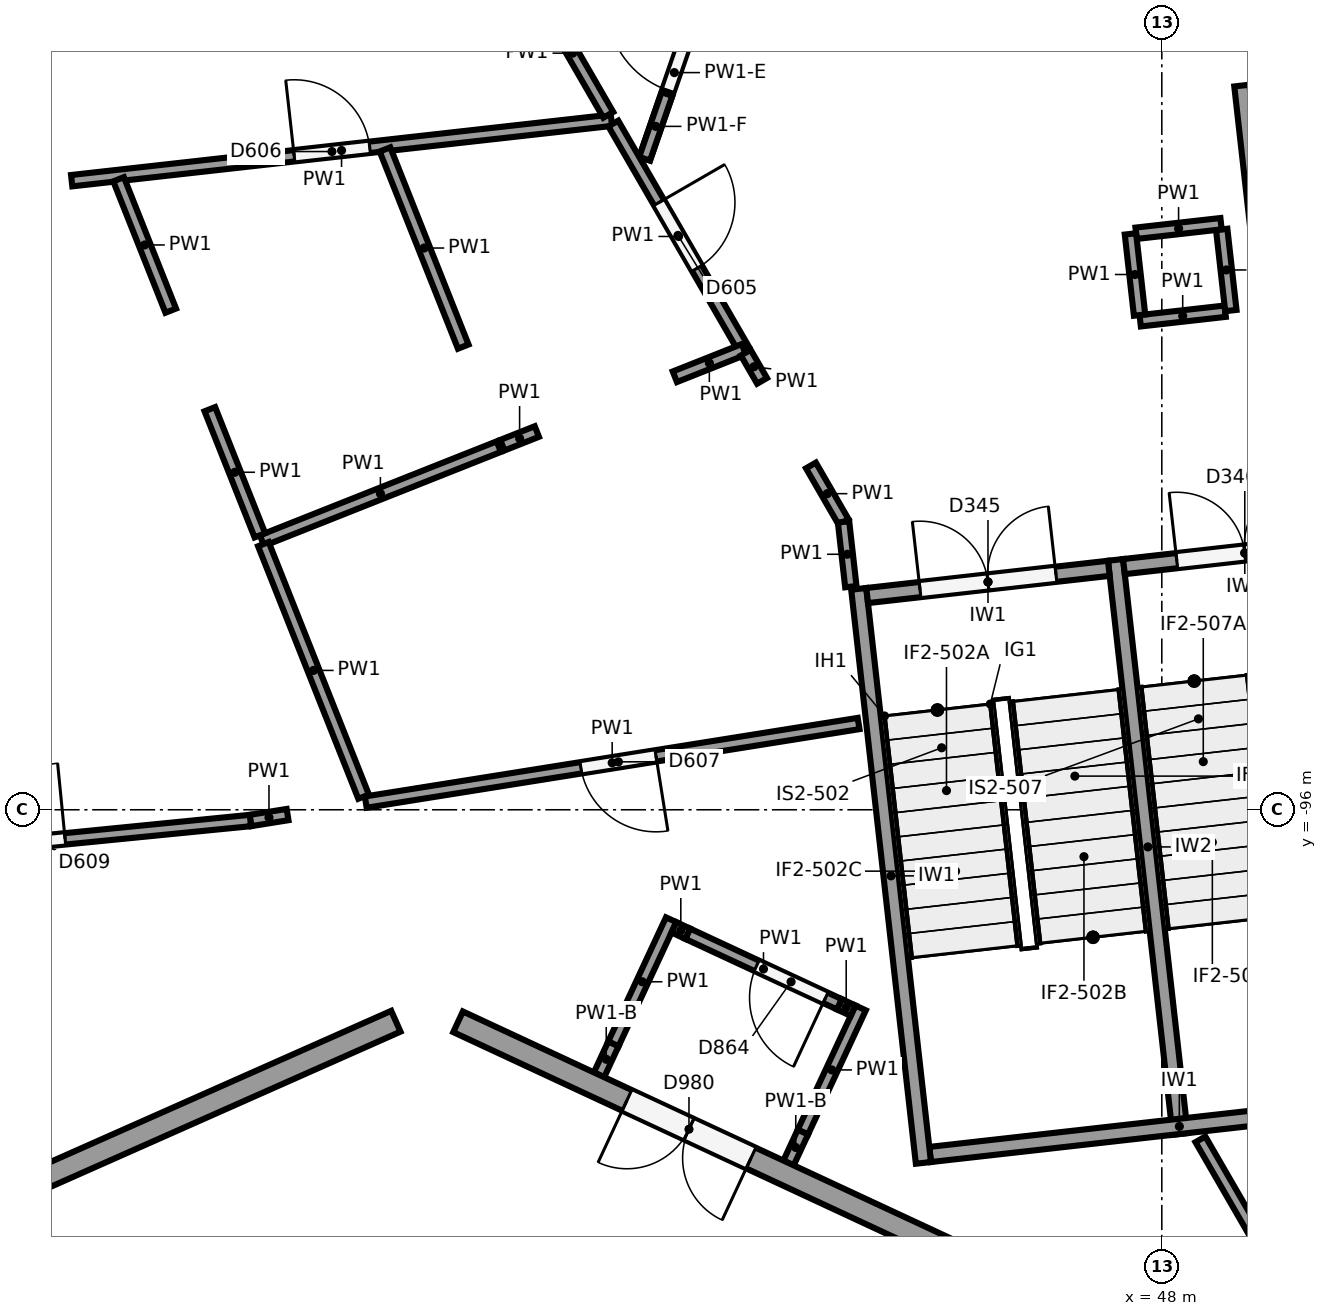
"""IFC4 building model, lengths in metres.
Left out: names, types, materials, properties, quantities, classifications, styles, units other than length and angle.
Written with IfcOpenShell. Run it as: python <this file> out.ifc"""

import sys

from ifc_helpers import new_model, si_unit, direction, frame, frame_2d, origin, origin_2d, place, context, subcontext, project, spatial, rectangle, circle, extrude, element, fill, save


model = new_model("IFC4")
c1 = context("Model", 3, precision=1e-05, world=origin(), true_north=direction((0.0, 1.0)))
c2 = subcontext(c1, "Body", "Model", "MODEL_VIEW")
j1 = project(units=[si_unit("LENGTHUNIT", "METRE"), si_unit("PLANEANGLEUNIT", "RADIAN")], contexts=[c1])
p1 = place(None, origin())
s1 = spatial("IfcSite", under=j1, at=p1, CompositionType="ELEMENT")
p2 = place(p1, origin())
s2 = spatial("IfcBuilding", under=s1, at=p2, CompositionType="ELEMENT")
p3 = place(p2, origin())
s3 = spatial("IfcBuildingStorey", under=s2, at=p3, CompositionType="ELEMENT", Elevation=0.0)
for number, where, z_axis, x_axis in (
    (1, (34.531, -89.912, 0.0), (0.0, 0.0, 1.0), (1.0, 0.0, 0.0)),
    (2, (38.333, -98.6, 0.0), (0.0, 0.0, 1.0), (1.0, 0.0, 0.0)),
):
    element("IfcColumn", number, at=place(p3, frame(where, z_axis=z_axis, x_axis=x_axis)), inside=s3, PredefinedType="COLUMN", context=c2, shape_type="SweptSolid", body=[
        extrude(circle(Radius=0.45, at=origin_2d()), origin(), (0.0, 0.0, 1.0), 6.5),
    ])
p4 = place(p3, frame((44.683, -91.091, 0.0), z_axis=(0.0, 0.0, 1.0), x_axis=(1.0, 0.0, 0.0)))
e3 = element("IfcColumn", 3, at=p4, inside=s3, PredefinedType="COLUMN", context=c2, shape_type="SweptSolid", body=[
    extrude(circle(Radius=0.55, at=origin_2d()), origin(), (0.0, 0.0, 1.0), 6.5),
])
p5 = place(p3, frame((37.922, -98.782, 0.0), z_axis=(0.0, 0.0, 1.0), x_axis=(-0.914138897099, -0.405401130748, 0.0)))
e4 = element("IfcWall", 4, at=p5, inside=s3, PredefinedType="SOLIDWALL", context=c2, shape_type="SweptSolid", body=[
    extrude(rectangle(XDim=15.824, YDim=0.3, at=frame_2d((7.912, 0.0))), origin(), (0.0, 0.0, 1.0), 4.85),
])
p6 = place(p3, frame((51.569, -104.757, 0.0), z_axis=(0.0, 0.0, 1.0), x_axis=(-0.906698705786, 0.421778919491, 0.0)))
e5 = element("IfcWall", 5, at=p6, inside=s3, PredefinedType="SOLIDWALL", context=c2, shape_type="SweptSolid", body=[
    extrude(rectangle(XDim=14.148, YDim=0.3, at=frame_2d((7.074, 0.0))), origin(), (0.0, 0.0, 1.0), 4.85),
])
p7 = place(p6, frame((9.897, 0.0, 0.0)))
e6 = element("IfcOpeningElement", 6, at=p7, cuts=e5, PredefinedType="OPENING", context=c2, shape_type="SweptSolid", body=[
    extrude(rectangle(XDim=1.8, YDim=2.4, at=frame_2d((0.9, 1.2))), frame((0.0, 0.16, 0.0), z_axis=(0.0, -1.0, 0.0), x_axis=(1.0, 0.0, 0.0)), (0.0, 0.0, 1.0), 0.32),
])
p8 = place(p3, frame((44.863, -100.646, 0.0), z_axis=(0.0, 0.0, 1.0), x_axis=(-0.111951003472, 0.993713727802, 0.0)))
e7 = element("IfcWall", 7, at=p8, inside=s3, PredefinedType="SHEAR", context=c2, shape_type="SweptSolid", body=[
    extrude(rectangle(XDim=7.6, YDim=0.2, at=frame_2d((3.8, 0.0))), origin(), (0.0, 0.0, 1.0), 6.15),
])
p9 = place(p3, frame((44.951, -100.535, 0.0), z_axis=(0.0, 0.0, 1.0), x_axis=(0.993711575492, 0.111970106426, 0.0)))
e8 = element("IfcWall", 8, at=p9, inside=s3, PredefinedType="SHEAR", context=c2, shape_type="SweptSolid", body=[
    extrude(rectangle(XDim=6.6, YDim=0.2, at=frame_2d((3.3, 0.0))), origin(), (0.0, 0.0, 1.0), 6.15),
])
p10 = place(p3, frame((48.242, -100.265, 0.0), z_axis=(0.0, 0.0, 1.0), x_axis=(-0.111954577255, 0.993713325176, 0.0)))
e9 = element("IfcWall", 9, at=p10, inside=s3, PredefinedType="SHEAR", context=c2, shape_type="SweptSolid", body=[
    extrude(rectangle(XDim=7.6, YDim=0.2, at=frame_2d((3.8, 0.0))), origin(), (0.0, 0.0, 1.0), 6.15),
])
p11 = place(p3, frame((44.123, -93.182, 0.0), z_axis=(0.0, 0.0, 1.0), x_axis=(0.993717005286, 0.11192190762, 0.0)))
e10 = element("IfcWall", 10, at=p11, inside=s3, PredefinedType="SHEAR", context=c2, shape_type="SweptSolid", body=[
    extrude(rectangle(XDim=3.2, YDim=0.2, at=frame_2d((1.6, 0.0))), origin(), (0.0, 0.0, 1.0), 6.15),
])
p12 = place(p11, frame((0.7, 0.0, 0.0)))
e11 = element("IfcOpeningElement", 11, at=p12, cuts=e10, PredefinedType="OPENING", context=c2, shape_type="SweptSolid", body=[
    extrude(rectangle(XDim=1.8, YDim=2.1, at=frame_2d((0.9, 1.05))), frame((0.0, 0.11, 0.0), z_axis=(0.0, -1.0, 0.0), x_axis=(1.0, 0.0, 0.0)), (0.0, 0.0, 1.0), 0.22),
])
p13 = place(p3, frame((47.502, -92.801, 0.0), z_axis=(0.0, 0.0, 1.0), x_axis=(0.993707560215, 0.112005735442, 0.0)))
e12 = element("IfcWall", 12, at=p13, inside=s3, PredefinedType="SHEAR", context=c2, shape_type="SweptSolid", body=[
    extrude(rectangle(XDim=3.2, YDim=0.2, at=frame_2d((1.6, 0.0))), origin(), (0.0, 0.0, 1.0), 6.15),
])
p14 = place(p13, frame((0.7, 0.0, 0.0)))
e13 = element("IfcOpeningElement", 13, at=p14, cuts=e12, PredefinedType="OPENING", context=c2, shape_type="SweptSolid", body=[
    extrude(rectangle(XDim=1.8, YDim=2.1, at=frame_2d((0.9, 1.05))), frame((0.0, 0.11, 0.0), z_axis=(0.0, -1.0, 0.0), x_axis=(1.0, 0.0, 0.0)), (0.0, 0.0, 1.0), 0.22),
])
p15 = place(p3, frame((49.389, -89.454, 0.0), z_axis=(0.0, 0.0, 1.0), x_axis=(-0.111976588553, 0.993710845073, 0.0)))
e14 = element("IfcWall", 14, at=p15, inside=s3, PredefinedType="SHEAR", context=c2, shape_type="SweptSolid", body=[
    extrude(rectangle(XDim=3.0, YDim=0.2, at=frame_2d((1.5, 0.0))), origin(), (0.0, 0.0, 1.0), 6.15),
])
p16 = place(p3, frame((33.657, -87.724, 0.0), z_axis=(0.0, 0.0, 1.0), x_axis=(0.993792986052, 0.111245228541, 0.0)))
e15 = element("IfcWall", 15, at=p16, inside=s3, PredefinedType="PARTITIONING", context=c2, shape_type="SweptSolid", body=[
    extrude(rectangle(XDim=7.146, YDim=0.15, at=frame_2d((3.573, 0.0))), origin(), (0.0, 0.0, 1.0), 6.15),
])
p17 = place(p16, frame((2.946, 0.0, 0.0)))
e16 = element("IfcOpeningElement", 16, at=p17, cuts=e15, PredefinedType="OPENING", context=c2, shape_type="SweptSolid", body=[
    extrude(rectangle(XDim=1.0, YDim=2.1, at=frame_2d((0.5, 1.05))), frame((0.0, 0.085, 0.0), z_axis=(0.0, -1.0, 0.0), x_axis=(1.0, 0.0, 0.0)), (0.0, 0.0, 1.0), 0.17),
])
p18 = place(p3, frame((39.779, -85.235, 0.0), z_axis=(0.0, 0.0, 1.0), x_axis=(0.500425153996, -0.865779801825, 0.0)))
e17 = element("IfcWall", 17, at=p18, inside=s3, PredefinedType="PARTITIONING", context=c2, shape_type="SweptSolid", body=[
    extrude(rectangle(XDim=1.874, YDim=0.15, at=frame_2d((0.937, 0.0))), origin(), (0.0, 0.0, 1.0), 6.15),
])
p19 = place(p3, frame((40.783, -86.972, 0.0), z_axis=(0.0, 0.0, 1.0), x_axis=(0.500377149394, -0.865807546955, 0.0)))
e18 = element("IfcWall", 18, at=p19, inside=s3, PredefinedType="PARTITIONING", context=c2, shape_type="SweptSolid", body=[
    extrude(rectangle(XDim=3.432, YDim=0.15, at=frame_2d((1.716, 0.0))), origin(), (0.0, 0.0, 1.0), 6.15),
])
p20 = place(p19, frame((1.2, 0.0, 0.0)))
e19 = element("IfcOpeningElement", 19, at=p20, cuts=e18, PredefinedType="OPENING", context=c2, shape_type="SweptSolid", body=[
    extrude(rectangle(XDim=1.0, YDim=2.1, at=frame_2d((0.5, 1.05))), frame((0.0, 0.085, 0.0), z_axis=(0.0, -1.0, 0.0), x_axis=(1.0, 0.0, 0.0)), (0.0, 0.0, 1.0), 0.17),
])
p21 = place(p3, frame((42.501, -89.943, 0.0), z_axis=(0.0, 0.0, 1.0), x_axis=(-0.929524719877, -0.368759806837, 0.0)))
e20 = element("IfcWall", 20, at=p21, inside=s3, PredefinedType="PARTITIONING", context=c2, shape_type="SweptSolid", body=[
    extrude(rectangle(XDim=0.977, YDim=0.15, at=frame_2d((0.488, 0.0))), origin(), (0.0, 0.0, 1.0), 6.15),
])
p22 = place(p3, frame((39.777, -91.024, 0.0), z_axis=(0.0, 0.0, 1.0), x_axis=(-0.929439007566, -0.368975786758, 0.0)))
e21 = element("IfcWall", 21, at=p22, inside=s3, PredefinedType="PARTITIONING", context=c2, shape_type="SweptSolid", body=[
    extrude(rectangle(XDim=0.488, YDim=0.15, at=frame_2d((0.244, 0.0))), origin(), (0.0, 0.0, 1.0), 6.15),
])
p23 = place(p3, frame((38.809, -89.907, 0.0), z_axis=(0.0, 0.0, 1.0), x_axis=(-0.368870710823, 0.929480714537, 0.0)))
e22 = element("IfcWall", 22, at=p23, inside=s3, PredefinedType="PARTITIONING", context=c2, shape_type="SweptSolid", body=[
    extrude(rectangle(XDim=2.791, YDim=0.15, at=frame_2d((1.396, 0.0))), origin(), (0.0, 0.0, 1.0), 6.15),
])
p24 = place(p3, frame((39.277, -91.222, 0.0), z_axis=(0.0, 0.0, 1.0), x_axis=(-0.929492692584, -0.368840527103, 0.0)))
e23 = element("IfcWall", 23, at=p24, inside=s3, PredefinedType="PARTITIONING", context=c2, shape_type="SweptSolid", body=[
    extrude(rectangle(XDim=3.353, YDim=0.15, at=frame_2d((1.676, 0.0))), origin(), (0.0, 0.0, 1.0), 6.15),
])
p25 = place(p3, frame((36.133, -92.389, 0.0), z_axis=(0.0, 0.0, 1.0), x_axis=(-0.368794869891, 0.929510808943, 0.0)))
e24 = element("IfcWall", 24, at=p25, inside=s3, PredefinedType="PARTITIONING", context=c2, shape_type="SweptSolid", body=[
    extrude(rectangle(XDim=1.785, YDim=0.15, at=frame_2d((0.892, 0.0))), origin(), (0.0, 0.0, 1.0), 6.15),
])
p26 = place(p3, frame((34.96, -89.434, 0.0), z_axis=(0.0, 0.0, 1.0), x_axis=(-0.368854520824, 0.929487139485, 0.0)))
e25 = element("IfcWall", 25, at=p26, inside=s3, PredefinedType="PARTITIONING", context=c2, shape_type="SweptSolid", body=[
    extrude(rectangle(XDim=1.86, YDim=0.15, at=frame_2d((0.93, 0.0))), origin(), (0.0, 0.0, 1.0), 6.15),
])
p27 = place(p3, frame((44.011, -94.865, 0.0), z_axis=(0.0, 0.0, 1.0), x_axis=(-0.98752031679, -0.157491663037, 0.0)))
e26 = element("IfcWall", 26, at=p27, inside=s3, PredefinedType="PARTITIONING", context=c2, shape_type="SweptSolid", body=[
    extrude(rectangle(XDim=6.567, YDim=0.15, at=frame_2d((3.283, 0.0))), origin(), (0.0, 0.0, 1.0), 6.15),
])
p28 = place(p27, frame((2.7, 0.0, 0.0)))
e27 = element("IfcOpeningElement", 27, at=p28, cuts=e26, PredefinedType="OPENING", context=c2, shape_type="SweptSolid", body=[
    extrude(rectangle(XDim=1.0, YDim=2.1, at=frame_2d((0.5, 1.05))), frame((0.0, 0.085, 0.0), z_axis=(0.0, -1.0, 0.0), x_axis=(1.0, 0.0, 0.0)), (0.0, 0.0, 1.0), 0.17),
])
p29 = place(p3, frame((37.498, -95.828, 0.0), z_axis=(0.0, 0.0, 1.0), x_axis=(-0.368822104186, 0.929500002939, 0.0)))
e28 = element("IfcWall", 28, at=p29, inside=s3, PredefinedType="PARTITIONING", context=c2, shape_type="SweptSolid", body=[
    extrude(rectangle(XDim=3.574, YDim=0.15, at=frame_2d((1.787, 0.0))), origin(), (0.0, 0.0, 1.0), 6.15),
])
p30 = place(p3, frame((42.526, -89.986, 0.0), z_axis=(0.0, 0.0, 1.0), x_axis=(0.500182682664, -0.865919906206, 0.0)))
e29 = element("IfcWall", 29, at=p30, inside=s3, PredefinedType="PARTITIONING", context=c2, shape_type="SweptSolid", body=[
    extrude(rectangle(XDim=0.428, YDim=0.15, at=frame_2d((0.214, 0.0))), origin(), (0.0, 0.0, 1.0), 6.15),
])
p31 = place(p3, frame((43.384, -91.47, 0.0), z_axis=(0.0, 0.0, 1.0), x_axis=(0.500396216532, -0.865796527182, 0.0)))
e30 = element("IfcWall", 30, at=p31, inside=s3, PredefinedType="PARTITIONING", context=c2, shape_type="SweptSolid", body=[
    extrude(rectangle(XDim=0.857, YDim=0.15, at=frame_2d((0.429, 0.0))), origin(), (0.0, 0.0, 1.0), 6.15),
])
p32 = place(p3, frame((43.812, -92.212, 0.0), z_axis=(0.0, 0.0, 1.0), x_axis=(0.112117924941, -0.993694908363, 0.0)))
e31 = element("IfcWall", 31, at=p32, inside=s3, PredefinedType="PARTITIONING", context=c2, shape_type="SweptSolid", body=[
    extrude(rectangle(XDim=0.858, YDim=0.15, at=frame_2d((0.429, 0.0))), origin(), (0.0, 0.0, 1.0), 6.15),
])
p33 = place(p3, frame((36.498, -96.063, 0.0), z_axis=(0.0, 0.0, 1.0), x_axis=(-0.987477522221, -0.157759763909, 0.0)))
e32 = element("IfcWall", 32, at=p33, inside=s3, PredefinedType="PARTITIONING", context=c2, shape_type="SweptSolid", body=[
    extrude(rectangle(XDim=0.495, YDim=0.15, at=frame_2d((0.248, 0.0))), origin(), (0.0, 0.0, 1.0), 6.15),
])
p34 = place(p3, frame((30.0, -96.736, 0.0), z_axis=(0.0, 0.0, 1.0), x_axis=(0.995133204742, 0.098538849293, 0.0)))
e33 = element("IfcWall", 33, at=p34, inside=s3, PredefinedType="PARTITIONING", context=c2, shape_type="SweptSolid", body=[
    extrude(rectangle(XDim=6.038, YDim=0.15, at=frame_2d((3.019, 0.0))), origin(), (0.0, 0.0, 1.0), 6.15),
])
p35 = place(p34, frame((2.588, 0.0, 0.0)))
e34 = element("IfcOpeningElement", 34, at=p35, cuts=e33, PredefinedType="OPENING", context=c2, shape_type="SweptSolid", body=[
    extrude(rectangle(XDim=1.0, YDim=2.1, at=frame_2d((0.5, 1.05))), frame((0.0, 0.085, 0.0), z_axis=(0.0, -1.0, 0.0), x_axis=(1.0, 0.0, 0.0)), (0.0, 0.0, 1.0), 0.17),
])
p36 = place(p3, frame((48.508, -100.336, 0.0), z_axis=(0.0, 0.0, 1.0), x_axis=(0.500439359674, -0.865771590715, 0.0)))
e35 = element("IfcWall", 35, at=p36, inside=s3, PredefinedType="PARTITIONING", context=c2, shape_type="SweptSolid", body=[
    extrude(rectangle(XDim=3.822, YDim=0.15, at=frame_2d((1.911, 0.0))), origin(), (0.0, 0.0, 1.0), 6.15),
])
p37 = place(p3, frame((47.716, -89.567, 0.0), z_axis=(0.0, 0.0, 1.0), x_axis=(0.993710504932, 0.11197960702, 0.0)))
e36 = element("IfcWall", 36, at=p37, inside=s3, PredefinedType="PARTITIONING", context=c2, shape_type="SweptSolid", body=[
    extrude(rectangle(XDim=1.125, YDim=0.15, at=frame_2d((0.562, 0.0))), origin(), (0.0, 0.0, 1.0), 6.15),
])
p38 = place(p3, frame((48.908, -89.432, 0.0), z_axis=(0.0, 0.0, 1.0), x_axis=(-0.111951742856, 0.993713644503, 0.0)))
e37 = element("IfcWall", 37, at=p38, inside=s3, PredefinedType="PARTITIONING", context=c2, shape_type="SweptSolid", body=[
    extrude(rectangle(XDim=1.075, YDim=0.15, at=frame_2d((0.538, 0.0))), origin(), (0.0, 0.0, 1.0), 6.15),
])
p39 = place(p3, frame((48.78, -88.29, 0.0), z_axis=(0.0, 0.0, 1.0), x_axis=(-0.993710504932, -0.11197960702, 0.0)))
e38 = element("IfcWall", 38, at=p39, inside=s3, PredefinedType="PARTITIONING", context=c2, shape_type="SweptSolid", body=[
    extrude(rectangle(XDim=1.125, YDim=0.15, at=frame_2d((0.562, 0.0))), origin(), (0.0, 0.0, 1.0), 6.15),
])
p40 = place(p3, frame((47.587, -88.424, 0.0), z_axis=(0.0, 0.0, 1.0), x_axis=(0.111951742856, -0.993713644503, 0.0)))
e39 = element("IfcWall", 39, at=p40, inside=s3, PredefinedType="PARTITIONING", context=c2, shape_type="SweptSolid", body=[
    extrude(rectangle(XDim=1.075, YDim=0.15, at=frame_2d((0.538, 0.0))), origin(), (0.0, 0.0, 1.0), 6.15),
])
p41 = place(p3, frame((43.089, -100.647, 0.0), z_axis=(0.0, 0.0, 1.0), x_axis=(0.421429993288, 0.906860937938, 0.0)))
e40 = element("IfcWall", 40, at=p41, inside=s3, PredefinedType="PARTITIONING", context=c2, shape_type="SweptSolid", body=[
    extrude(rectangle(XDim=0.45, YDim=0.15, at=frame_2d((0.225, 0.0))), origin(), (0.0, 0.0, 1.0), 4.85),
])
p42 = place(p3, frame((43.279, -100.239, 0.0), z_axis=(0.0, 0.0, 1.0), x_axis=(0.421860420743, 0.906660788504, 0.0)))
e41 = element("IfcWall", 41, at=p42, inside=s3, PredefinedType="PARTITIONING", context=c2, shape_type="SweptSolid", body=[
    extrude(rectangle(XDim=1.8, YDim=0.15, at=frame_2d((0.9, 0.0))), origin(), (0.0, 0.0, 1.0), 6.15),
])
p43 = place(p3, frame((40.595, -99.487, 0.0), z_axis=(0.0, 0.0, 1.0), x_axis=(0.42163737055, 0.90676453821, 0.0)))
e42 = element("IfcWall", 42, at=p43, inside=s3, PredefinedType="PARTITIONING", context=c2, shape_type="SweptSolid", body=[
    extrude(rectangle(XDim=0.45, YDim=0.15, at=frame_2d((0.225, 0.0))), origin(), (0.0, 0.0, 1.0), 4.85),
])
p44 = place(p3, frame((40.785, -99.079, 0.0), z_axis=(0.0, 0.0, 1.0), x_axis=(0.421697036053, 0.906736791899, 0.0)))
e43 = element("IfcWall", 43, at=p44, inside=s3, PredefinedType="PARTITIONING", context=c2, shape_type="SweptSolid", body=[
    extrude(rectangle(XDim=1.8, YDim=0.15, at=frame_2d((0.9, 0.0))), origin(), (0.0, 0.0, 1.0), 6.15),
])
p45 = place(p3, frame((43.938, -98.643, 0.0), z_axis=(0.0, 0.0, 1.0), x_axis=(-0.906775442705, 0.421613918778, 0.0)))
e44 = element("IfcWall", 44, at=p45, inside=s3, PredefinedType="PARTITIONING", context=c2, shape_type="SweptSolid", body=[
    extrude(rectangle(XDim=0.2, YDim=0.15, at=frame_2d((0.1, 0.0))), origin(), (0.0, 0.0, 1.0), 6.15),
])
p46 = place(p3, frame((43.757, -98.559, 0.0), z_axis=(0.0, 0.0, 1.0), x_axis=(-0.906698414225, 0.421779546258, 0.0)))
e45 = element("IfcWall", 45, at=p46, inside=s3, PredefinedType="PARTITIONING", context=c2, shape_type="SweptSolid", body=[
    extrude(rectangle(XDim=2.2, YDim=0.15, at=frame_2d((1.1, 0.0))), origin(), (0.0, 0.0, 1.0), 6.15),
])
p47 = place(p46, frame((0.2, 0.0, 0.0)))
e46 = element("IfcOpeningElement", 46, at=p47, cuts=e45, PredefinedType="OPENING", context=c2, shape_type="SweptSolid", body=[
    extrude(rectangle(XDim=1.0, YDim=2.1, at=frame_2d((0.5, 1.05))), frame((0.0, 0.085, 0.0), z_axis=(0.0, -1.0, 0.0), x_axis=(1.0, 0.0, 0.0)), (0.0, 0.0, 1.0), 0.17),
])
p48 = place(p3, frame((41.762, -97.631, 0.0), z_axis=(0.0, 0.0, 1.0), x_axis=(-0.906775442705, 0.421613918778, 0.0)))
e47 = element("IfcWall", 47, at=p48, inside=s3, PredefinedType="PARTITIONING", context=c2, shape_type="SweptSolid", body=[
    extrude(rectangle(XDim=0.2, YDim=0.15, at=frame_2d((0.1, 0.0))), origin(), (0.0, 0.0, 1.0), 6.15),
])
p49 = place(p3, frame((41.195, -87.435, 0.0), z_axis=(0.0, 0.0, 1.0), x_axis=(0.326232368525, 0.94528960733, 0.0)))
e48 = element("IfcWall", 48, at=p49, inside=s3, PredefinedType="PARTITIONING", context=c2, shape_type="SweptSolid", body=[
    extrude(rectangle(XDim=2.397, YDim=0.15, at=frame_2d((1.198, 0.0))), origin(), (0.0, 0.0, 1.0), 5.25),
])
p50 = place(p49, frame((0.95, 0.0, 0.0)))
e49 = element("IfcOpeningElement", 49, at=p50, cuts=e48, PredefinedType="OPENING", context=c2, shape_type="SweptSolid", body=[
    extrude(rectangle(XDim=1.2, YDim=2.1, at=frame_2d((0.6, 1.05))), frame((0.0, 0.085, 0.0), z_axis=(0.0, -1.0, 0.0), x_axis=(1.0, 0.0, 0.0)), (0.0, 0.0, 1.0), 0.17),
])
p51 = place(p3, frame((41.195, -87.435, 5.25), z_axis=(0.0, 0.0, 1.0), x_axis=(0.326057561257, 0.945349917622, 0.0)))
e50 = element("IfcWall", 50, at=p51, inside=s3, PredefinedType="PARTITIONING", context=c2, shape_type="SweptSolid", body=[
    extrude(rectangle(XDim=0.9, YDim=0.15, at=frame_2d((0.45, 0.0))), origin(), (0.0, 0.0, 1.0), 0.9),
])
p52 = place(p7, origin())
e51 = element("IfcDoor", 51, at=p52, inside=s3, OperationType="DOUBLE_DOOR_SINGLE_SWING", PredefinedType="DOOR", context=c2, shape_type="SweptSolid", body=[
    extrude(rectangle(XDim=1.8, YDim=2.4, at=frame_2d((0.9, 1.2))), frame((0.0, 0.025, 0.0), z_axis=(0.0, -1.0, 0.0), x_axis=(1.0, 0.0, 0.0)), (0.0, 0.0, 1.0), 0.05),
])
fill(e6, e51)
p53 = place(p12, origin())
e52 = element("IfcDoor", 52, at=p53, inside=s3, OperationType="DOUBLE_DOOR_SINGLE_SWING", PredefinedType="DOOR", context=c2, shape_type="SweptSolid", body=[
    extrude(rectangle(XDim=1.8, YDim=2.1, at=frame_2d((0.9, 1.05))), frame((0.0, 0.025, 0.0), z_axis=(0.0, -1.0, 0.0), x_axis=(1.0, 0.0, 0.0)), (0.0, 0.0, 1.0), 0.05),
])
fill(e11, e52)
p54 = place(p14, origin())
e53 = element("IfcDoor", 53, at=p54, inside=s3, OperationType="DOUBLE_DOOR_SINGLE_SWING", PredefinedType="DOOR", context=c2, shape_type="SweptSolid", body=[
    extrude(rectangle(XDim=1.8, YDim=2.1, at=frame_2d((0.9, 1.05))), frame((0.0, 0.025, 0.0), z_axis=(0.0, -1.0, 0.0), x_axis=(1.0, 0.0, 0.0)), (0.0, 0.0, 1.0), 0.05),
])
fill(e13, e53)
p55 = place(p17, origin())
e54 = element("IfcDoor", 54, at=p55, inside=s3, OperationType="SINGLE_SWING_LEFT", PredefinedType="DOOR", context=c2, shape_type="SweptSolid", body=[
    extrude(rectangle(XDim=1.0, YDim=2.1, at=frame_2d((0.5, 1.05))), frame((0.0, 0.025, 0.0), z_axis=(0.0, -1.0, 0.0), x_axis=(1.0, 0.0, 0.0)), (0.0, 0.0, 1.0), 0.05),
])
fill(e16, e54)
p56 = place(p20, origin())
e55 = element("IfcDoor", 55, at=p56, inside=s3, OperationType="SINGLE_SWING_LEFT", PredefinedType="DOOR", context=c2, shape_type="SweptSolid", body=[
    extrude(rectangle(XDim=1.0, YDim=2.1, at=frame_2d((0.5, 1.05))), frame((0.0, 0.025, 0.0), z_axis=(0.0, -1.0, 0.0), x_axis=(1.0, 0.0, 0.0)), (0.0, 0.0, 1.0), 0.05),
])
fill(e19, e55)
p57 = place(p28, origin())
e56 = element("IfcDoor", 56, at=p57, inside=s3, OperationType="SINGLE_SWING_LEFT", PredefinedType="DOOR", context=c2, shape_type="SweptSolid", body=[
    extrude(rectangle(XDim=1.0, YDim=2.1, at=frame_2d((0.5, 1.05))), frame((0.0, 0.025, 0.0), z_axis=(0.0, -1.0, 0.0), x_axis=(1.0, 0.0, 0.0)), (0.0, 0.0, 1.0), 0.05),
])
fill(e27, e56)
p58 = place(p35, origin())
e57 = element("IfcDoor", 57, at=p58, inside=s3, OperationType="SINGLE_SWING_RIGHT", PredefinedType="DOOR", context=c2, shape_type="SweptSolid", body=[
    extrude(rectangle(XDim=1.0, YDim=2.1, at=frame_2d((0.5, 1.05))), frame((0.0, 0.025, 0.0), z_axis=(0.0, -1.0, 0.0), x_axis=(1.0, 0.0, 0.0)), (0.0, 0.0, 1.0), 0.05),
])
fill(e34, e57)
p59 = place(p47, origin())
e58 = element("IfcDoor", 58, at=p59, inside=s3, OperationType="SINGLE_SWING_LEFT", PredefinedType="DOOR", context=c2, shape_type="SweptSolid", body=[
    extrude(rectangle(XDim=1.0, YDim=2.1, at=frame_2d((0.5, 1.05))), frame((0.0, 0.025, 0.0), z_axis=(0.0, -1.0, 0.0), x_axis=(1.0, 0.0, 0.0)), (0.0, 0.0, 1.0), 0.05),
])
fill(e46, e58)
p60 = place(p50, origin())
e59 = element("IfcDoor", 59, at=p60, inside=s3, OperationType="SINGLE_SWING_RIGHT", PredefinedType="DOOR", context=c2, shape_type="SweptSolid", body=[
    extrude(rectangle(XDim=1.2, YDim=2.1, at=frame_2d((0.6, 1.05))), frame((0.0, 0.025, 0.0), z_axis=(0.0, -1.0, 0.0), x_axis=(1.0, 0.0, 0.0)), (0.0, 0.0, 1.0), 0.05),
])
fill(e49, e59)
save(model, sys.argv[1])
